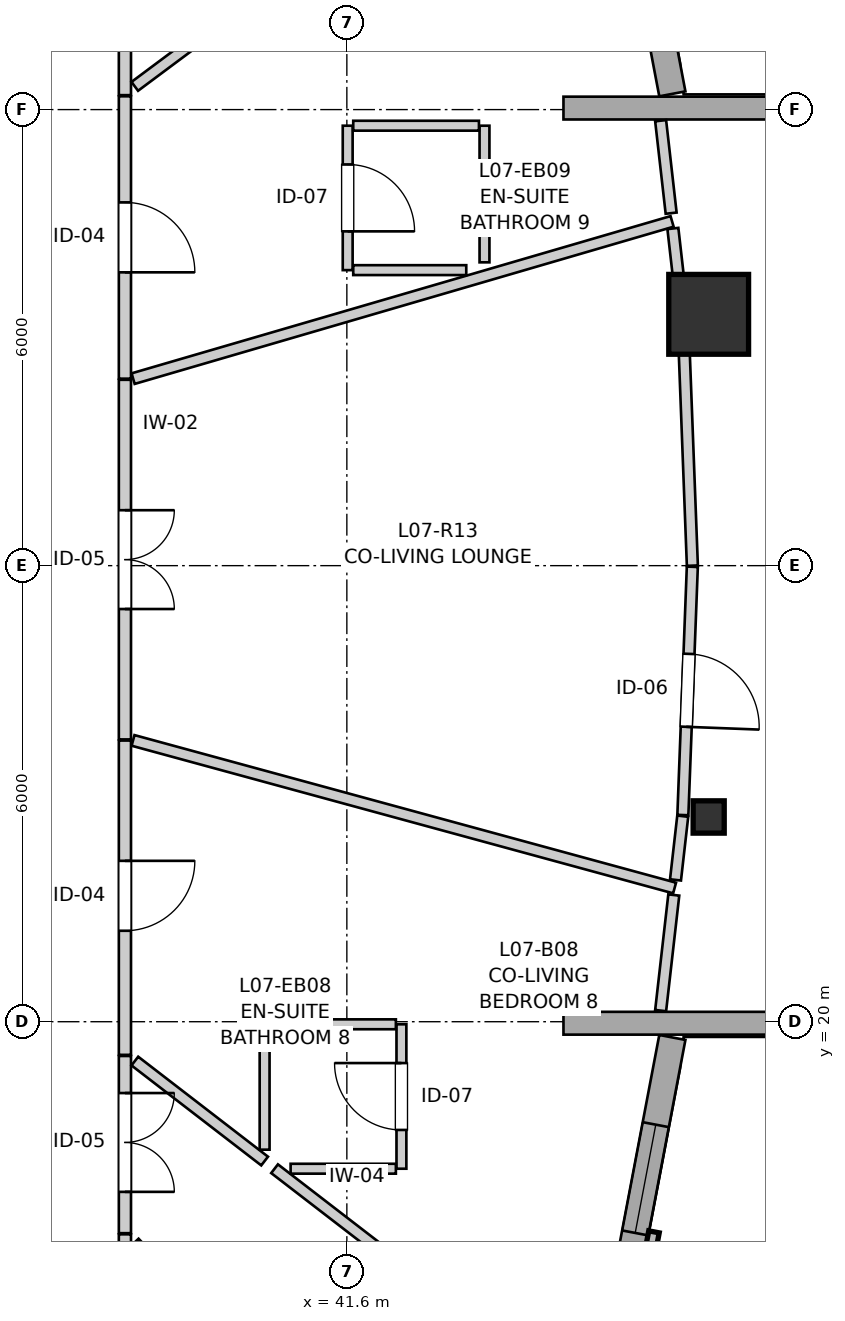
"""IFC4 building model, lengths in metres.
Left out: names, types, materials, properties, quantities, classifications, styles, units other than length and angle.
Written with IfcOpenShell. Run it as: python <this file> out.ifc"""

import sys

from ifc_helpers import new_model, si_unit, direction, frame, frame_2d, origin, origin_2d, place, context, subcontext, project, spatial, rectangle, i_section, extrude, source, transform, mapped, element, fill, save


model = new_model("IFC4")
c1 = context("Model", 3, precision=1e-05, world=origin(), true_north=direction((0.0, 1.0)))
c2 = subcontext(c1, "Body", "Model", "MODEL_VIEW")
j1 = project(units=[si_unit("LENGTHUNIT", "METRE"), si_unit("PLANEANGLEUNIT", "RADIAN")], contexts=[c1])
p1 = place(None, origin())
s1 = spatial("IfcSite", under=j1, at=p1, CompositionType="ELEMENT")
p2 = place(p1, origin())
s2 = spatial("IfcBuilding", under=s1, at=p2, CompositionType="ELEMENT")
p3 = place(p2, frame((0.0, 0.0, 27.0)))
s3 = spatial("IfcBuildingStorey", under=s2, at=p3, CompositionType="ELEMENT", Elevation=27.0)
m1 = source(origin(), c2, "Body", "SweptSolid", [
    extrude(i_section(OverallWidth=0.409, OverallDepth=0.425, WebThickness=0.03, FlangeThickness=0.048, FilletRadius=0.015, at=origin_2d()), origin(), (0.0, 0.0, 1.0), 2.935),
])
p4 = place(p3, frame((46.361, 22.694, 0.0), z_axis=(0.0, 0.0, 1.0), x_axis=(1.0, 0.0, 0.0)))
e1 = element("IfcColumn", 1, at=p4, inside=s3, PredefinedType="PILASTER", context=c2, shape_type="MappedRepresentation", body=[
    mapped(m1, transform((0.0, 0.0, 0.0), x_axis=(1.0, 0.0, 0.0), y_axis=(0.0, 1.0, 0.0), z_axis=(0.0, 0.0, 1.0), scale=1.0)),
])
m2 = source(origin(), c2, "Body", "SweptSolid", [
    extrude(rectangle(XDim=1.05, YDim=1.05, at=origin_2d()), origin(), (0.0, 0.0, 1.0), 2.935),
])
p5 = place(p3, frame((46.361, 29.306, 0.0), z_axis=(0.0, 0.0, 1.0), x_axis=(1.0, 0.0, 0.0)))
e2 = element("IfcColumn", 2, at=p5, inside=s3, PredefinedType="COLUMN", context=c2, shape_type="MappedRepresentation", body=[
    mapped(m2, transform((0.0, 0.0, 0.0), x_axis=(1.0, 0.0, 0.0), y_axis=(0.0, 1.0, 0.0), z_axis=(0.0, 0.0, 1.0), scale=1.0)),
])
p6 = place(p3, frame((45.24, 16.408, 0.0), z_axis=(0.0, 0.0, 1.0), x_axis=(0.186636709983, 0.982428999209, 0.0)))
e3 = element("IfcWall", 3, at=p6, inside=s3, PredefinedType="SOLIDWALL", context=c2, shape_type="SweptSolid", body=[
    extrude(rectangle(XDim=3.446, YDim=0.35, at=frame_2d((1.723, 0.0))), origin(), (0.0, 0.0, 1.0), 2.415),
])
p7 = place(p6, frame((0.828, 0.0, 0.82)))
e4 = element("IfcOpeningElement", 4, at=p7, cuts=e3, PredefinedType="OPENING", context=c2, shape_type="SweptSolid", body=[
    extrude(rectangle(XDim=1.45, YDim=1.25, at=frame_2d((0.725, 0.625))), frame((0.0, 0.185, 0.0), z_axis=(0.0, -1.0, 0.0), x_axis=(1.0, 0.0, 0.0)), (0.0, 0.0, 1.0), 0.37),
])
p8 = place(p3, frame((45.883, 32.207, 0.0), z_axis=(0.0, 0.0, 1.0), x_axis=(-0.186693533797, 0.982418202416, 0.0)))
e5 = element("IfcWall", 5, at=p8, inside=s3, PredefinedType="SOLIDWALL", context=c2, shape_type="SweptSolid", body=[
    extrude(rectangle(XDim=3.726, YDim=0.35, at=frame_2d((1.863, 0.0))), origin(), (0.0, 0.0, 1.0), 2.415),
])
p9 = place(p8, frame((1.313, 0.0, 0.82)))
e6 = element("IfcOpeningElement", 6, at=p9, cuts=e5, PredefinedType="OPENING", context=c2, shape_type="SweptSolid", body=[
    extrude(rectangle(XDim=1.45, YDim=1.25, at=frame_2d((0.725, 0.625))), frame((0.0, 0.185, 0.0), z_axis=(0.0, -1.0, 0.0), x_axis=(1.0, 0.0, 0.0)), (0.0, 0.0, 1.0), 0.37),
])
for number, where, z_axis, x_axis in (
    (7, (44.45, 32.02, 0.0), (0.0, 0.0, 1.0), (1.0, 0.0, 0.0)),
    (8, (44.45, 19.98, 0.0), (0.0, 0.0, 1.0), (1.0, 0.0, 0.0)),
):
    element("IfcWall", number, at=place(p3, frame(where, z_axis=z_axis, x_axis=x_axis)), inside=s3, PredefinedType="SOLIDWALL", context=c2, shape_type="SweptSolid", body=[
        extrude(rectangle(XDim=20.685, YDim=0.3, at=frame_2d((10.342, 0.0))), origin(), (0.0, 0.0, 1.0), 2.115),
    ])
p10 = place(p3, frame((38.68, 28.445, 0.0), z_axis=(0.0, 0.0, 1.0), x_axis=(0.0, -1.0, 0.0)))
e9 = element("IfcWall", 9, at=p10, inside=s3, PredefinedType="PARTITIONING", context=c2, shape_type="SweptSolid", body=[
    extrude(rectangle(XDim=4.731, YDim=0.16, at=frame_2d((2.365, 0.0))), origin(), (0.0, 0.0, 1.0), 2.935),
])
p11 = place(p10, frame((1.716, 0.0, 0.0)))
e10 = element("IfcOpeningElement", 10, at=p11, cuts=e9, PredefinedType="OPENING", context=c2, shape_type="SweptSolid", body=[
    extrude(rectangle(XDim=1.3, YDim=2.1, at=frame_2d((0.65, 1.05))), frame((0.0, 0.09, 0.0), z_axis=(0.0, -1.0, 0.0), x_axis=(1.0, 0.0, 0.0)), (0.0, 0.0, 1.0), 0.18),
])
p12 = place(p3, frame((38.68, 36.58, 0.0), z_axis=(0.0, 0.0, 1.0), x_axis=(0.0, -1.0, 0.0)))
e11 = element("IfcWall", 11, at=p12, inside=s3, PredefinedType="PARTITIONING", context=c2, shape_type="SweptSolid", body=[
    extrude(rectangle(XDim=4.39, YDim=0.16, at=frame_2d((2.195, 0.0))), origin(), (0.0, 0.0, 1.0), 2.935),
])
p13 = place(p12, frame((1.726, 0.0, 0.0)))
e12 = element("IfcOpeningElement", 12, at=p13, cuts=e11, PredefinedType="OPENING", context=c2, shape_type="SweptSolid", body=[
    extrude(rectangle(XDim=0.92, YDim=2.1, at=frame_2d((0.46, 1.05))), frame((0.0, 0.09, 0.0), z_axis=(0.0, -1.0, 0.0), x_axis=(1.0, 0.0, 0.0)), (0.0, 0.0, 1.0), 0.18),
])
p14 = place(p3, frame((38.68, 23.699, 0.0), z_axis=(0.0, 0.0, 1.0), x_axis=(0.0, -1.0, 0.0)))
e13 = element("IfcWall", 13, at=p14, inside=s3, PredefinedType="PARTITIONING", context=c2, shape_type="SweptSolid", body=[
    extrude(rectangle(XDim=4.135, YDim=0.16, at=frame_2d((2.067, 0.0))), origin(), (0.0, 0.0, 1.0), 2.935),
])
p15 = place(p14, frame((1.583, 0.0, 0.0)))
e14 = element("IfcOpeningElement", 14, at=p15, cuts=e13, PredefinedType="OPENING", context=c2, shape_type="SweptSolid", body=[
    extrude(rectangle(XDim=0.92, YDim=2.1, at=frame_2d((0.46, 1.05))), frame((0.0, 0.09, 0.0), z_axis=(0.0, -1.0, 0.0), x_axis=(1.0, 0.0, 0.0)), (0.0, 0.0, 1.0), 0.18),
])
p16 = place(p3, frame((38.68, 32.175, 0.0), z_axis=(0.0, 0.0, 1.0), x_axis=(0.0, -1.0, 0.0)))
e15 = element("IfcWall", 15, at=p16, inside=s3, PredefinedType="PARTITIONING", context=c2, shape_type="SweptSolid", body=[
    extrude(rectangle(XDim=3.715, YDim=0.16, at=frame_2d((1.857, 0.0))), origin(), (0.0, 0.0, 1.0), 2.935),
])
p17 = place(p16, frame((1.396, 0.0, 0.0)))
e16 = element("IfcOpeningElement", 16, at=p17, cuts=e15, PredefinedType="OPENING", context=c2, shape_type="SweptSolid", body=[
    extrude(rectangle(XDim=0.92, YDim=2.1, at=frame_2d((0.46, 1.05))), frame((0.0, 0.09, 0.0), z_axis=(0.0, -1.0, 0.0), x_axis=(1.0, 0.0, 0.0)), (0.0, 0.0, 1.0), 0.18),
])
p18 = place(p3, frame((46.146, 25.985, 0.0), z_axis=(0.0, 0.0, 1.0), x_axis=(-0.038094618751, -0.999274136572, 0.0)))
e17 = element("IfcWall", 17, at=p18, inside=s3, PredefinedType="PARTITIONING", context=c2, shape_type="SweptSolid", body=[
    extrude(rectangle(XDim=3.269, YDim=0.145, at=frame_2d((1.634, 0.0))), origin(), (0.0, 0.0, 1.0), 2.403),
])
p19 = place(p18, frame((1.147, 0.0, 0.0)))
e18 = element("IfcOpeningElement", 18, at=p19, cuts=e17, PredefinedType="OPENING", context=c2, shape_type="SweptSolid", body=[
    extrude(rectangle(XDim=0.96, YDim=2.1, at=frame_2d((0.48, 1.05))), frame((0.0, 0.083, 0.0), z_axis=(0.0, -1.0, 0.0), x_axis=(1.0, 0.0, 0.0)), (0.0, 0.0, 1.0), 0.165),
])
p20 = place(p3, frame((38.68, 19.549, 0.0), z_axis=(0.0, 0.0, 1.0), x_axis=(0.0, -1.0, 0.0)))
e19 = element("IfcWall", 19, at=p20, inside=s3, PredefinedType="PARTITIONING", context=c2, shape_type="SweptSolid", body=[
    extrude(rectangle(XDim=2.331, YDim=0.16, at=frame_2d((1.166, 0.0))), origin(), (0.0, 0.0, 1.0), 2.935),
])
p21 = place(p20, frame((0.488, 0.0, 0.0)))
e20 = element("IfcOpeningElement", 20, at=p21, cuts=e19, PredefinedType="OPENING", context=c2, shape_type="SweptSolid", body=[
    extrude(rectangle(XDim=1.3, YDim=2.1, at=frame_2d((0.65, 1.05))), frame((0.0, 0.09, 0.0), z_axis=(0.0, -1.0, 0.0), x_axis=(1.0, 0.0, 0.0)), (0.0, 0.0, 1.0), 0.18),
])
p22 = place(p3, frame((42.318, 18.066, 0.0), z_axis=(0.0, 0.0, 1.0), x_axis=(0.0, 1.0, 0.0)))
e21 = element("IfcWall", 21, at=p22, inside=s3, PredefinedType="PARTITIONING", context=c2, shape_type="SweptSolid", body=[
    extrude(rectangle(XDim=1.9, YDim=0.13, at=frame_2d((0.95, 0.0))), origin(), (0.0, 0.0, 1.0), 2.935),
])
p23 = place(p22, frame((0.51, 0.0, 0.0)))
e22 = element("IfcOpeningElement", 22, at=p23, cuts=e21, PredefinedType="OPENING", context=c2, shape_type="SweptSolid", body=[
    extrude(rectangle(XDim=0.88, YDim=2.05, at=frame_2d((0.44, 1.025))), frame((0.0, 0.075, 0.0), z_axis=(0.0, -1.0, 0.0), x_axis=(1.0, 0.0, 0.0)), (0.0, 0.0, 1.0), 0.15),
])
p24 = place(p3, frame((41.611, 31.788, 0.0), z_axis=(0.0, 0.0, 1.0), x_axis=(0.0, -1.0, 0.0)))
e23 = element("IfcWall", 23, at=p24, inside=s3, PredefinedType="PARTITIONING", context=c2, shape_type="SweptSolid", body=[
    extrude(rectangle(XDim=1.9, YDim=0.13, at=frame_2d((0.95, 0.0))), origin(), (0.0, 0.0, 1.0), 2.935),
])
p25 = place(p24, frame((0.51, 0.0, 0.0)))
e24 = element("IfcOpeningElement", 24, at=p25, cuts=e23, PredefinedType="OPENING", context=c2, shape_type="SweptSolid", body=[
    extrude(rectangle(XDim=0.88, YDim=2.05, at=frame_2d((0.44, 1.025))), frame((0.0, 0.075, 0.0), z_axis=(0.0, -1.0, 0.0), x_axis=(1.0, 0.0, 0.0)), (0.0, 0.0, 1.0), 0.15),
])
p26 = place(p3, frame((38.68, 17.203, 0.0), z_axis=(0.0, 0.0, 1.0), x_axis=(0.0, -1.0, 0.0)))
e25 = element("IfcWall", 25, at=p26, inside=s3, PredefinedType="PARTITIONING", context=c2, shape_type="SweptSolid", body=[
    extrude(rectangle(XDim=1.783, YDim=0.16, at=frame_2d((0.892, 0.0))), origin(), (0.0, 0.0, 1.0), 2.935),
])
p27 = place(p26, frame((0.398, 0.0, 0.0)))
e26 = element("IfcOpeningElement", 26, at=p27, cuts=e25, PredefinedType="OPENING", context=c2, shape_type="SweptSolid", body=[
    extrude(rectangle(XDim=0.95, YDim=2.1, at=frame_2d((0.475, 1.05))), frame((0.0, 0.09, 0.0), z_axis=(0.0, -1.0, 0.0), x_axis=(1.0, 0.0, 0.0)), (0.0, 0.0, 1.0), 0.18),
])
p28 = place(p3, frame((38.81, 32.306, 0.0), z_axis=(0.0, 0.0, 1.0), x_axis=(0.801799720797, 0.597592844443, 0.0)))
e27 = element("IfcWall", 27, at=p28, inside=s3, PredefinedType="PARTITIONING", context=c2, shape_type="SweptSolid", body=[
    extrude(rectangle(XDim=7.424, YDim=0.145, at=frame_2d((3.712, 0.0))), origin(), (0.0, 0.0, 1.0), 2.935),
])
p29 = place(p3, frame((38.788, 28.46, 0.0), z_axis=(0.0, 0.0, 1.0), x_axis=(0.959983709987, 0.280055845432, 0.0)))
e28 = element("IfcWall", 28, at=p29, inside=s3, PredefinedType="PARTITIONING", context=c2, shape_type="SweptSolid", body=[
    extrude(rectangle(XDim=7.386, YDim=0.145, at=frame_2d((3.693, 0.0))), origin(), (0.0, 0.0, 1.0), 2.935),
])
p30 = place(p3, frame((38.787, 23.701, 0.0), z_axis=(0.0, 0.0, 1.0), x_axis=(0.964810342249, -0.262946769308, 0.0)))
e29 = element("IfcWall", 29, at=p30, inside=s3, PredefinedType="PARTITIONING", context=c2, shape_type="SweptSolid", body=[
    extrude(rectangle(XDim=7.385, YDim=0.145, at=frame_2d((3.692, 0.0))), origin(), (0.0, 0.0, 1.0), 2.935),
])
p31 = place(p3, frame((38.812, 17.101, 0.0), z_axis=(0.0, 0.0, 1.0), x_axis=(0.689140556814, -0.724627692649, 0.0)))
e30 = element("IfcWall", 30, at=p31, inside=s3, PredefinedType="PARTITIONING", context=c2, shape_type="SweptSolid", body=[
    extrude(rectangle(XDim=7.217, YDim=0.13, at=frame_2d((3.608, 0.0))), origin(), (0.0, 0.0, 1.0), 2.935),
])
p32 = place(p3, frame((40.649, 18.066, 0.0), z_axis=(0.0, 0.0, 1.0), x_axis=(0.792155051101, -0.610319895641, 0.0)))
e31 = element("IfcWall", 31, at=p32, inside=s3, PredefinedType="PARTITIONING", context=c2, shape_type="SweptSolid", body=[
    extrude(rectangle(XDim=5.093, YDim=0.145, at=frame_2d((2.546, 0.0))), origin(), (0.0, 0.0, 1.0), 2.935),
])
p33 = place(p3, frame((46.021, 29.281, 0.0), z_axis=(0.0, 0.0, 1.0), x_axis=(0.038070453861, -0.999275057501, 0.0)))
e32 = element("IfcWall", 32, at=p33, inside=s3, PredefinedType="PARTITIONING", context=c2, shape_type="SweptSolid", body=[
    extrude(rectangle(XDim=3.283, YDim=0.145, at=frame_2d((1.642, 0.0))), origin(), (0.0, 0.0, 1.0), 2.403),
])
p34 = place(p3, frame((38.811, 19.482, 0.0), z_axis=(0.0, 0.0, 1.0), x_axis=(0.792185877025, -0.61027988353, 0.0)))
e33 = element("IfcWall", 33, at=p34, inside=s3, PredefinedType="PARTITIONING", context=c2, shape_type="SweptSolid", body=[
    extrude(rectangle(XDim=2.156, YDim=0.145, at=frame_2d((1.078, 0.0))), origin(), (0.0, 0.0, 1.0), 2.935),
])
p35 = place(p3, frame((43.411, 29.99, 0.0), z_axis=(0.0, 0.0, 1.0), x_axis=(0.0, 1.0, 0.0)))
e34 = element("IfcWall", 34, at=p35, inside=s3, PredefinedType="PARTITIONING", context=c2, shape_type="SweptSolid", body=[
    extrude(rectangle(XDim=1.798, YDim=0.13, at=frame_2d((0.899, 0.0))), origin(), (0.0, 0.0, 1.0), 2.935),
])
p36 = place(p3, frame((41.684, 31.788, 0.0), z_axis=(0.0, 0.0, 1.0), x_axis=(1.0, 0.0, 0.0)))
e35 = element("IfcWall", 35, at=p36, inside=s3, PredefinedType="PARTITIONING", context=c2, shape_type="SweptSolid", body=[
    extrude(rectangle(XDim=1.654, YDim=0.13, at=frame_2d((0.827, 0.0))), origin(), (0.0, 0.0, 1.0), 2.103),
])
p37 = place(p3, frame((41.684, 29.888, 0.0), z_axis=(0.0, 0.0, 1.0), x_axis=(1.0, 0.0, 0.0)))
e36 = element("IfcWall", 36, at=p37, inside=s3, PredefinedType="PARTITIONING", context=c2, shape_type="SweptSolid", body=[
    extrude(rectangle(XDim=1.487, YDim=0.13, at=frame_2d((0.743, 0.0))), origin(), (0.0, 0.0, 1.0), 2.935),
])
p38 = place(p3, frame((40.518, 19.966, 0.0), z_axis=(0.0, 0.0, 1.0), x_axis=(1.0, 0.0, 0.0)))
e37 = element("IfcWall", 37, at=p38, inside=s3, PredefinedType="PARTITIONING", context=c2, shape_type="SweptSolid", body=[
    extrude(rectangle(XDim=1.727, YDim=0.13, at=frame_2d((0.864, 0.0))), origin(), (0.0, 0.0, 1.0), 2.103),
])
p39 = place(p3, frame((40.518, 18.317, 0.0), z_axis=(0.0, 0.0, 1.0), x_axis=(0.0, 1.0, 0.0)))
e38 = element("IfcWall", 38, at=p39, inside=s3, PredefinedType="PARTITIONING", context=c2, shape_type="SweptSolid", body=[
    extrude(rectangle(XDim=1.576, YDim=0.13, at=frame_2d((0.788, 0.0))), origin(), (0.0, 0.0, 1.0), 2.935),
])
p40 = place(p3, frame((40.86, 18.066, 0.0), z_axis=(0.0, 0.0, 1.0), x_axis=(1.0, 0.0, 0.0)))
e39 = element("IfcWall", 39, at=p40, inside=s3, PredefinedType="PARTITIONING", context=c2, shape_type="SweptSolid", body=[
    extrude(rectangle(XDim=1.385, YDim=0.13, at=frame_2d((0.692, 0.0))), origin(), (0.0, 0.0, 1.0), 2.935),
])
p41 = place(p3, frame((45.729, 20.146, 0.0), z_axis=(0.0, 0.0, 1.0), x_axis=(0.113074294354, 0.993586535716, 0.0)))
e40 = element("IfcWall", 40, at=p41, inside=s3, PredefinedType="PARTITIONING", context=c2, shape_type="SweptSolid", body=[
    extrude(rectangle(XDim=1.531, YDim=0.145, at=frame_2d((0.765, 0.0))), origin(), (0.0, 0.0, 1.0), 2.403),
])
p42 = place(p3, frame((45.89, 30.436, 0.0), z_axis=(0.0, 0.0, 1.0), x_axis=(0.113024308153, -0.993592223081, 0.0)))
e41 = element("IfcWall", 41, at=p42, inside=s3, PredefinedType="PARTITIONING", context=c2, shape_type="SweptSolid", body=[
    extrude(rectangle(XDim=1.147, YDim=0.145, at=frame_2d((0.573, 0.0))), origin(), (0.0, 0.0, 1.0), 2.403),
])
p43 = place(p3, frame((45.729, 31.854, 0.0), z_axis=(0.0, 0.0, 1.0), x_axis=(0.112860473391, -0.993610846129, 0.0)))
e42 = element("IfcWall", 42, at=p43, inside=s3, PredefinedType="PARTITIONING", context=c2, shape_type="SweptSolid", body=[
    extrude(rectangle(XDim=1.224, YDim=0.145, at=frame_2d((0.612, 0.0))), origin(), (0.0, 0.0, 1.0), 2.403),
])
p44 = place(p3, frame((45.924, 21.866, 0.0), z_axis=(0.0, 0.0, 1.0), x_axis=(0.112844765803, 0.993612630169, 0.0)))
e43 = element("IfcWall", 43, at=p44, inside=s3, PredefinedType="PARTITIONING", context=c2, shape_type="SweptSolid", body=[
    extrude(rectangle(XDim=0.844, YDim=0.145, at=frame_2d((0.422, 0.0))), origin(), (0.0, 0.0, 1.0), 2.403),
])
m3 = source(origin(), c2, "Body", "SweptSolid", [
    extrude(rectangle(XDim=1.45, YDim=1.25, at=frame_2d((0.725, 0.625))), frame((0.0, 0.03, 0.0), z_axis=(0.0, -1.0, 0.0), x_axis=(1.0, 0.0, 0.0)), (0.0, 0.0, 1.0), 0.06),
])
p45 = place(p7, origin())
e44 = element("IfcWindow", 44, at=p45, inside=s3, PartitioningType="SINGLE_PANEL", PredefinedType="WINDOW", context=c2, shape_type="MappedRepresentation", body=[
    mapped(m3, transform((0.0, 0.0, 0.0), x_axis=(1.0, 0.0, 0.0), y_axis=(0.0, 1.0, 0.0), z_axis=(0.0, 0.0, 1.0), scale=1.0)),
])
fill(e4, e44)
m4 = source(origin(), c2, "Body", "SweptSolid", [
    extrude(rectangle(XDim=1.3, YDim=2.1, at=frame_2d((0.65, 1.05))), frame((0.0, 0.025, 0.0), z_axis=(0.0, -1.0, 0.0), x_axis=(1.0, 0.0, 0.0)), (0.0, 0.0, 1.0), 0.05),
])
p46 = place(p11, origin())
e45 = element("IfcDoor", 45, at=p46, inside=s3, OperationType="DOUBLE_DOOR_SINGLE_SWING", PredefinedType="DOOR", context=c2, shape_type="MappedRepresentation", body=[
    mapped(m4, transform((0.0, 0.0, 0.0), x_axis=(1.0, 0.0, 0.0), y_axis=(0.0, 1.0, 0.0), z_axis=(0.0, 0.0, 1.0), scale=1.0)),
])
fill(e10, e45)
m5 = source(origin(), c2, "Body", "SweptSolid", [
    extrude(rectangle(XDim=0.92, YDim=2.1, at=frame_2d((0.46, 1.05))), frame((0.0, 0.025, 0.0), z_axis=(0.0, -1.0, 0.0), x_axis=(1.0, 0.0, 0.0)), (0.0, 0.0, 1.0), 0.05),
])
p47 = place(p15, origin())
e46 = element("IfcDoor", 46, at=p47, inside=s3, OperationType="SINGLE_SWING_LEFT", PredefinedType="DOOR", context=c2, shape_type="MappedRepresentation", body=[
    mapped(m5, transform((0.0, 0.0, 0.0), x_axis=(1.0, 0.0, 0.0), y_axis=(0.0, 1.0, 0.0), z_axis=(0.0, 0.0, 1.0), scale=1.0)),
])
fill(e14, e46)
p48 = place(p17, origin())
e47 = element("IfcDoor", 47, at=p48, inside=s3, OperationType="SINGLE_SWING_RIGHT", PredefinedType="DOOR", context=c2, shape_type="MappedRepresentation", body=[
    mapped(m5, transform((0.0, 0.0, 0.0), x_axis=(1.0, 0.0, 0.0), y_axis=(0.0, 1.0, 0.0), z_axis=(0.0, 0.0, 1.0), scale=1.0)),
])
fill(e16, e47)
m6 = source(origin(), c2, "Body", "SweptSolid", [
    extrude(rectangle(XDim=0.96, YDim=2.1, at=frame_2d((0.48, 1.05))), frame((0.0, 0.025, 0.0), z_axis=(0.0, -1.0, 0.0), x_axis=(1.0, 0.0, 0.0)), (0.0, 0.0, 1.0), 0.05),
])
p49 = place(p19, origin())
e48 = element("IfcDoor", 48, at=p49, inside=s3, OperationType="SINGLE_SWING_RIGHT", PredefinedType="DOOR", context=c2, shape_type="MappedRepresentation", body=[
    mapped(m6, transform((0.0, 0.0, 0.0), x_axis=(1.0, 0.0, 0.0), y_axis=(0.0, 1.0, 0.0), z_axis=(0.0, 0.0, 1.0), scale=1.0)),
])
fill(e18, e48)
p50 = place(p21, origin())
e49 = element("IfcDoor", 49, at=p50, inside=s3, OperationType="DOUBLE_DOOR_SINGLE_SWING", PredefinedType="DOOR", context=c2, shape_type="MappedRepresentation", body=[
    mapped(m4, transform((0.0, 0.0, 0.0), x_axis=(1.0, 0.0, 0.0), y_axis=(0.0, 1.0, 0.0), z_axis=(0.0, 0.0, 1.0), scale=1.0)),
])
fill(e20, e49)
m7 = source(origin(), c2, "Body", "SweptSolid", [
    extrude(rectangle(XDim=0.88, YDim=2.05, at=frame_2d((0.44, 1.025))), frame((0.0, 0.025, 0.0), z_axis=(0.0, -1.0, 0.0), x_axis=(1.0, 0.0, 0.0)), (0.0, 0.0, 1.0), 0.05),
])
p51 = place(p23, origin())
e50 = element("IfcDoor", 50, at=p51, inside=s3, OperationType="SINGLE_SWING_RIGHT", PredefinedType="DOOR", context=c2, shape_type="MappedRepresentation", body=[
    mapped(m7, transform((0.0, 0.0, 0.0), x_axis=(1.0, 0.0, 0.0), y_axis=(0.0, 1.0, 0.0), z_axis=(0.0, 0.0, 1.0), scale=1.0)),
])
fill(e22, e50)
p52 = place(p25, origin())
e51 = element("IfcDoor", 51, at=p52, inside=s3, OperationType="SINGLE_SWING_RIGHT", PredefinedType="DOOR", context=c2, shape_type="MappedRepresentation", body=[
    mapped(m7, transform((0.0, 0.0, 0.0), x_axis=(1.0, 0.0, 0.0), y_axis=(0.0, 1.0, 0.0), z_axis=(0.0, 0.0, 1.0), scale=1.0)),
])
fill(e24, e51)
save(model, sys.argv[1])
